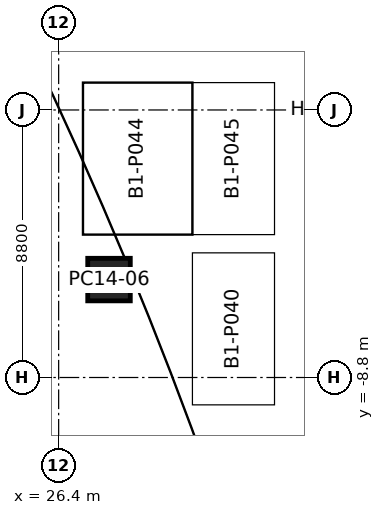
"""IFC4 building model, lengths in metres.
Left out: names, types, materials, properties, quantities, classifications, styles, units other than length and angle.
Written with IfcOpenShell. Run it as: python <this file> out.ifc"""

import sys

from ifc_helpers import new_model, si_unit, direction, frame, origin, origin_2d, place, context, subcontext, project, spatial, rectangle, extrude, element, save


model = new_model("IFC4")
c1 = context("Model", 3, precision=1e-05, world=origin(), true_north=direction((0.0, 1.0)))
c2 = subcontext(c1, "Body", "Model", "MODEL_VIEW")
j1 = project(units=[si_unit("LENGTHUNIT", "METRE"), si_unit("PLANEANGLEUNIT", "RADIAN")], contexts=[c1])
p1 = place(None, origin())
s1 = spatial("IfcSite", under=j1, at=p1, CompositionType="ELEMENT")
p2 = place(p1, origin())
s2 = spatial("IfcBuilding", under=s1, at=p2, CompositionType="ELEMENT")
p3 = place(p2, frame((0.0, 0.0, -4.5)))
s3 = spatial("IfcBuildingStorey", under=s2, at=p3, CompositionType="ELEMENT", Elevation=-4.5)
p4 = place(p3, frame((28.057, -5.579, 0.0), z_axis=(0.0, 0.0, 1.0), x_axis=(-0.382135123868, 0.924106458752, 0.0)))
e1 = element("IfcColumn", 1, at=p4, inside=s3, PredefinedType="COLUMN", context=c2, shape_type="SweptSolid", body=[
    extrude(rectangle(XDim=1.4, YDim=1.4, at=origin_2d()), origin(), (0.0, 0.0, 1.0), 4.5),
])
save(model, sys.argv[1])
